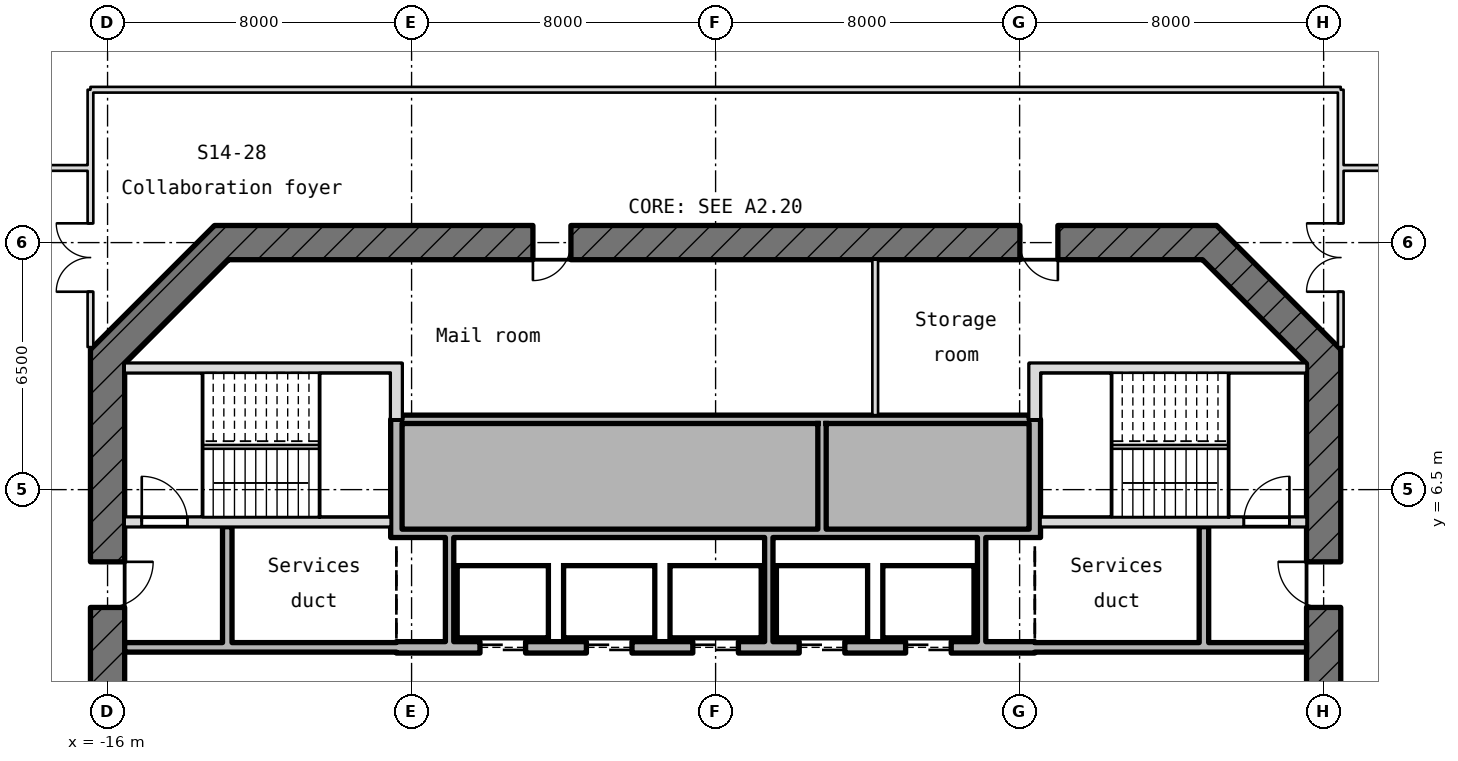
"""IFC4 building model, lengths in metres.
Left out: names, types, materials, properties, quantities, classifications, styles, units other than length and angle.
Written with IfcOpenShell. Run it as: python <this file> out.ifc"""

import sys

from ifc_helpers import new_model, si_unit, direction, frame, frame_2d, origin, place, context, subcontext, project, spatial, rectangle, extrude, element, fill, save


model = new_model("IFC4")
c1 = context("Model", 3, precision=1e-05, world=origin(), true_north=direction((0.0, 1.0)))
c2 = subcontext(c1, "Body", "Model", "MODEL_VIEW")
j1 = project(units=[si_unit("LENGTHUNIT", "METRE"), si_unit("PLANEANGLEUNIT", "RADIAN")], contexts=[c1])
p1 = place(None, origin())
s1 = spatial("IfcSite", under=j1, at=p1, CompositionType="ELEMENT")
p2 = place(p1, origin())
s2 = spatial("IfcBuilding", under=s1, at=p2, CompositionType="ELEMENT")
p3 = place(p2, frame((0.0, 0.0, 210.85)))
s3 = spatial("IfcBuildingStorey", under=s2, at=p3, CompositionType="ELEMENT", Elevation=210.85)
p4 = place(p3, frame((-15.495, 21.126, 0.0), z_axis=(0.0, 0.0, 1.0), x_axis=(-0.76593385613, -0.642919379109, 0.0)))
e1 = element("IfcWall", 1, at=p4, inside=s3, PredefinedType="SOLIDWALL", context=c2, shape_type="SweptSolid", body=[
    extrude(rectangle(XDim=11.213, YDim=0.3, at=frame_2d((5.607, 0.0))), origin(), (0.0, 0.0, 1.0), 3.97),
])
p5 = place(p4, frame((7.513, 0.0, 0.0)))
e2 = element("IfcOpeningElement", 2, at=p5, cuts=e1, PredefinedType="OPENING", context=c2, shape_type="SweptSolid", body=[
    extrude(rectangle(XDim=1.8, YDim=2.4, at=frame_2d((0.9, 1.2))), frame((0.0, 0.16, 0.0), z_axis=(0.0, -1.0, 0.0), x_axis=(1.0, 0.0, 0.0)), (0.0, 0.0, 1.0), 0.32),
])
p6 = place(p4, frame((4.913, 0.0, 0.9)))
e3 = element("IfcOpeningElement", 3, at=p6, cuts=e1, PredefinedType="OPENING", context=c2, shape_type="SweptSolid", body=[
    extrude(rectangle(XDim=2.0, YDim=1.5, at=frame_2d((1.0, 0.75))), frame((0.0, 0.16, 0.0), z_axis=(0.0, -1.0, 0.0), x_axis=(1.0, 0.0, 0.0)), (0.0, 0.0, 1.0), 0.32),
])
p7 = place(p3, frame((16.0, -10.186, -0.18), z_axis=(0.0, 0.0, 1.0), x_axis=(0.0, 1.0, 0.0)))
e4 = element("IfcWall", 4, at=p7, inside=s3, PredefinedType="SHEAR", context=c2, shape_type="SweptSolid", body=[
    extrude(rectangle(XDim=20.373, YDim=0.9, at=frame_2d((10.186, 0.0))), origin(), (0.0, 0.0, 1.0), 4.15),
])
p8 = place(p7, frame((8.986, 0.0, 0.18)))
e5 = element("IfcOpeningElement", 5, at=p8, cuts=e4, PredefinedType="OPENING", context=c2, shape_type="SweptSolid", body=[
    extrude(rectangle(XDim=2.4, YDim=2.1, at=frame_2d((1.2, 1.05))), frame((0.0, 0.46, 0.0), z_axis=(0.0, -1.0, 0.0), x_axis=(1.0, 0.0, 0.0)), (0.0, 0.0, 1.0), 0.92),
])
p9 = place(p7, frame((13.586, 0.0, 0.18)))
e6 = element("IfcOpeningElement", 6, at=p9, cuts=e4, PredefinedType="OPENING", context=c2, shape_type="SweptSolid", body=[
    extrude(rectangle(XDim=1.2, YDim=2.1, at=frame_2d((0.6, 1.05))), frame((0.0, 0.46, 0.0), z_axis=(0.0, -1.0, 0.0), x_axis=(1.0, 0.0, 0.0)), (0.0, 0.0, 1.0), 0.92),
])
p10 = place(p7, frame((4.786, 0.0, 0.18)))
e7 = element("IfcOpeningElement", 7, at=p10, cuts=e4, PredefinedType="OPENING", context=c2, shape_type="SweptSolid", body=[
    extrude(rectangle(XDim=1.2, YDim=2.1, at=frame_2d((0.6, 1.05))), frame((0.0, 0.46, 0.0), z_axis=(0.0, -1.0, 0.0), x_axis=(1.0, 0.0, 0.0)), (0.0, 0.0, 1.0), 0.92),
])
p11 = place(p3, frame((16.132, 9.868, -0.18), z_axis=(0.0, 0.0, 1.0), x_axis=(-0.707106781187, 0.707106781187, 0.0)))
e8 = element("IfcWall", 8, at=p11, inside=s3, PredefinedType="SHEAR", context=c2, shape_type="SweptSolid", body=[
    extrude(rectangle(XDim=4.615, YDim=0.9, at=frame_2d((2.308, 0.0))), origin(), (0.0, 0.0, 1.0), 4.15),
])
p12 = place(p3, frame((13.186, 13.0, -0.18), z_axis=(0.0, 0.0, 1.0), x_axis=(-1.0, 0.0, 0.0)))
e9 = element("IfcWall", 9, at=p12, inside=s3, PredefinedType="SHEAR", context=c2, shape_type="SweptSolid", body=[
    extrude(rectangle(XDim=26.373, YDim=0.9, at=frame_2d((13.186, 0.0))), origin(), (0.0, 0.0, 1.0), 4.15),
])
p13 = place(p12, frame((16.993, 0.0, 0.18)))
e10 = element("IfcOpeningElement", 10, at=p13, cuts=e9, PredefinedType="OPENING", context=c2, shape_type="SweptSolid", body=[
    extrude(rectangle(XDim=1.0, YDim=2.1, at=frame_2d((0.5, 1.05))), frame((0.0, 0.46, 0.0), z_axis=(0.0, -1.0, 0.0), x_axis=(1.0, 0.0, 0.0)), (0.0, 0.0, 1.0), 0.92),
])
p14 = place(p12, frame((4.179, 0.0, 0.18)))
e11 = element("IfcOpeningElement", 11, at=p14, cuts=e9, PredefinedType="OPENING", context=c2, shape_type="SweptSolid", body=[
    extrude(rectangle(XDim=1.0, YDim=2.1, at=frame_2d((0.5, 1.05))), frame((0.0, 0.46, 0.0), z_axis=(0.0, -1.0, 0.0), x_axis=(1.0, 0.0, 0.0)), (0.0, 0.0, 1.0), 0.92),
])
p15 = place(p3, frame((-12.868, 13.132, -0.18), z_axis=(0.0, 0.0, 1.0), x_axis=(-0.707106781187, -0.707106781187, 0.0)))
e12 = element("IfcWall", 12, at=p15, inside=s3, PredefinedType="SHEAR", context=c2, shape_type="SweptSolid", body=[
    extrude(rectangle(XDim=4.615, YDim=0.9, at=frame_2d((2.308, 0.0))), origin(), (0.0, 0.0, 1.0), 4.15),
])
p16 = place(p3, frame((-16.0, 10.186, -0.18), z_axis=(0.0, 0.0, 1.0), x_axis=(0.0, -1.0, 0.0)))
e13 = element("IfcWall", 13, at=p16, inside=s3, PredefinedType="SHEAR", context=c2, shape_type="SweptSolid", body=[
    extrude(rectangle(XDim=20.373, YDim=0.9, at=frame_2d((10.186, 0.0))), origin(), (0.0, 0.0, 1.0), 4.15),
])
p17 = place(p16, frame((8.986, 0.0, 0.18)))
e14 = element("IfcOpeningElement", 14, at=p17, cuts=e13, PredefinedType="OPENING", context=c2, shape_type="SweptSolid", body=[
    extrude(rectangle(XDim=2.4, YDim=2.1, at=frame_2d((1.2, 1.05))), frame((0.0, 0.46, 0.0), z_axis=(0.0, -1.0, 0.0), x_axis=(1.0, 0.0, 0.0)), (0.0, 0.0, 1.0), 0.92),
])
p18 = place(p16, frame((5.586, 0.0, 0.18)))
e15 = element("IfcOpeningElement", 15, at=p18, cuts=e13, PredefinedType="OPENING", context=c2, shape_type="SweptSolid", body=[
    extrude(rectangle(XDim=1.2, YDim=2.1, at=frame_2d((0.6, 1.05))), frame((0.0, 0.46, 0.0), z_axis=(0.0, -1.0, 0.0), x_axis=(1.0, 0.0, 0.0)), (0.0, 0.0, 1.0), 0.92),
])
p19 = place(p3, frame((-15.55, 2.35, 0.0), z_axis=(0.0, 0.0, 1.0), x_axis=(1.0, 0.0, 0.0)))
e16 = element("IfcWall", 16, at=p19, inside=s3, PredefinedType="STANDARD", context=c2, shape_type="SweptSolid", body=[
    extrude(rectangle(XDim=7.15, YDim=0.25, at=frame_2d((3.575, 0.0))), origin(), (0.0, 0.0, 1.0), 3.97),
])
p20 = place(p3, frame((-8.4, 2.35, -0.18), z_axis=(0.0, 0.0, 1.0), x_axis=(1.0, 0.0, 0.0)))
e17 = element("IfcWall", 17, at=p20, inside=s3, PredefinedType="SHEAR", context=c2, shape_type="SweptSolid", body=[
    extrude(rectangle(XDim=16.8, YDim=0.3, at=frame_2d((8.4, 0.0))), origin(), (0.0, 0.0, 1.0), 4.15),
])
p21 = place(p20, frame((2.2, 0.0, 0.18)))
e18 = element("IfcOpeningElement", 18, at=p21, cuts=e17, PredefinedType="OPENING", context=c2, shape_type="SweptSolid", body=[
    extrude(rectangle(XDim=1.2, YDim=2.1, at=frame_2d((0.6, 1.05))), frame((0.0, 0.16, 0.0), z_axis=(0.0, -1.0, 0.0), x_axis=(1.0, 0.0, 0.0)), (0.0, 0.0, 1.0), 0.32),
])
p22 = place(p20, frame((5.0, 0.0, 0.18)))
e19 = element("IfcOpeningElement", 19, at=p22, cuts=e17, PredefinedType="OPENING", context=c2, shape_type="SweptSolid", body=[
    extrude(rectangle(XDim=1.2, YDim=2.1, at=frame_2d((0.6, 1.05))), frame((0.0, 0.16, 0.0), z_axis=(0.0, -1.0, 0.0), x_axis=(1.0, 0.0, 0.0)), (0.0, 0.0, 1.0), 0.32),
])
p23 = place(p20, frame((7.8, 0.0, 0.18)))
e20 = element("IfcOpeningElement", 20, at=p23, cuts=e17, PredefinedType="OPENING", context=c2, shape_type="SweptSolid", body=[
    extrude(rectangle(XDim=1.2, YDim=2.1, at=frame_2d((0.6, 1.05))), frame((0.0, 0.16, 0.0), z_axis=(0.0, -1.0, 0.0), x_axis=(1.0, 0.0, 0.0)), (0.0, 0.0, 1.0), 0.32),
])
p24 = place(p20, frame((10.6, 0.0, 0.18)))
e21 = element("IfcOpeningElement", 21, at=p24, cuts=e17, PredefinedType="OPENING", context=c2, shape_type="SweptSolid", body=[
    extrude(rectangle(XDim=1.2, YDim=2.1, at=frame_2d((0.6, 1.05))), frame((0.0, 0.16, 0.0), z_axis=(0.0, -1.0, 0.0), x_axis=(1.0, 0.0, 0.0)), (0.0, 0.0, 1.0), 0.32),
])
p25 = place(p20, frame((13.4, 0.0, 0.18)))
e22 = element("IfcOpeningElement", 22, at=p25, cuts=e17, PredefinedType="OPENING", context=c2, shape_type="SweptSolid", body=[
    extrude(rectangle(XDim=1.2, YDim=2.1, at=frame_2d((0.6, 1.05))), frame((0.0, 0.16, 0.0), z_axis=(0.0, -1.0, 0.0), x_axis=(1.0, 0.0, 0.0)), (0.0, 0.0, 1.0), 0.32),
])
p26 = place(p3, frame((8.4, 2.35, 0.0), z_axis=(0.0, 0.0, 1.0), x_axis=(1.0, 0.0, 0.0)))
e23 = element("IfcWall", 23, at=p26, inside=s3, PredefinedType="STANDARD", context=c2, shape_type="SweptSolid", body=[
    extrude(rectangle(XDim=7.15, YDim=0.25, at=frame_2d((3.575, 0.0))), origin(), (0.0, 0.0, 1.0), 3.97),
])
p27 = place(p3, frame((-8.25, 5.35, 0.0), z_axis=(0.0, 0.0, 1.0), x_axis=(1.0, 0.0, 0.0)))
e24 = element("IfcWall", 24, at=p27, inside=s3, PredefinedType="STANDARD", context=c2, shape_type="SweptSolid", body=[
    extrude(rectangle(XDim=16.5, YDim=0.22, at=frame_2d((8.25, 0.0))), origin(), (0.0, 0.0, 1.0), 3.97),
])
p28 = place(p3, frame((-15.55, 5.65, -0.18), z_axis=(0.0, 0.0, 1.0), x_axis=(1.0, 0.0, 0.0)))
e25 = element("IfcWall", 25, at=p28, inside=s3, PredefinedType="SHEAR", context=c2, shape_type="SweptSolid", body=[
    extrude(rectangle(XDim=7.0, YDim=0.25, at=frame_2d((3.5, 0.0))), origin(), (0.0, 0.0, 1.0), 4.15),
])
p29 = place(p28, frame((0.45, 0.0, 0.18)))
e26 = element("IfcOpeningElement", 26, at=p29, cuts=e25, PredefinedType="OPENING", context=c2, shape_type="SweptSolid", body=[
    extrude(rectangle(XDim=1.2, YDim=2.1, at=frame_2d((0.6, 1.05))), frame((0.0, 0.135, 0.0), z_axis=(0.0, -1.0, 0.0), x_axis=(1.0, 0.0, 0.0)), (0.0, 0.0, 1.0), 0.27),
])
p30 = place(p3, frame((8.55, 5.65, -0.18), z_axis=(0.0, 0.0, 1.0), x_axis=(1.0, 0.0, 0.0)))
e27 = element("IfcWall", 27, at=p30, inside=s3, PredefinedType="SHEAR", context=c2, shape_type="SweptSolid", body=[
    extrude(rectangle(XDim=7.0, YDim=0.25, at=frame_2d((3.5, 0.0))), origin(), (0.0, 0.0, 1.0), 4.15),
])
p31 = place(p30, frame((5.35, 0.0, 0.18)))
e28 = element("IfcOpeningElement", 28, at=p31, cuts=e27, PredefinedType="OPENING", context=c2, shape_type="SweptSolid", body=[
    extrude(rectangle(XDim=1.2, YDim=2.1, at=frame_2d((0.6, 1.05))), frame((0.0, 0.135, 0.0), z_axis=(0.0, -1.0, 0.0), x_axis=(1.0, 0.0, 0.0)), (0.0, 0.0, 1.0), 0.27),
])
p32 = place(p3, frame((-8.25, 8.35, 0.0), z_axis=(0.0, 0.0, 1.0), x_axis=(1.0, 0.0, 0.0)))
e29 = element("IfcWall", 29, at=p32, inside=s3, PredefinedType="STANDARD", context=c2, shape_type="SweptSolid", body=[
    extrude(rectangle(XDim=16.5, YDim=0.22, at=frame_2d((8.25, 0.0))), origin(), (0.0, 0.0, 1.0), 3.97),
])
for number, where, z_axis, x_axis in (
    (30, (-15.55, 9.7, -0.18), (0.0, 0.0, 1.0), (1.0, 0.0, 0.0)),
    (31, (8.55, 9.7, -0.18), (0.0, 0.0, 1.0), (1.0, 0.0, 0.0)),
):
    element("IfcWall", number, at=place(p3, frame(where, z_axis=z_axis, x_axis=x_axis)), inside=s3, PredefinedType="SHEAR", context=c2, shape_type="SweptSolid", body=[
        extrude(rectangle(XDim=7.0, YDim=0.25, at=frame_2d((3.5, 0.0))), origin(), (0.0, 0.0, 1.0), 4.15),
    ])
p33 = place(p3, frame((-12.85, 2.475, 0.0), z_axis=(0.0, 0.0, 1.0), x_axis=(0.0, 1.0, 0.0)))
e32 = element("IfcWall", 32, at=p33, inside=s3, PredefinedType="STANDARD", context=c2, shape_type="SweptSolid", body=[
    extrude(rectangle(XDim=3.05, YDim=0.25, at=frame_2d((1.525, 0.0))), origin(), (0.0, 0.0, 1.0), 3.97),
])
p34 = place(p3, frame((-8.4, 5.24, -0.18), z_axis=(0.0, 0.0, 1.0), x_axis=(0.0, 1.0, 0.0)))
e33 = element("IfcWall", 33, at=p34, inside=s3, PredefinedType="SHEAR", context=c2, shape_type="SweptSolid", body=[
    extrude(rectangle(XDim=3.11, YDim=0.3, at=frame_2d((1.555, 0.0))), origin(), (0.0, 0.0, 1.0), 4.15),
])
p35 = place(p3, frame((-8.4, 8.35, -0.18), z_axis=(0.0, 0.0, 1.0), x_axis=(0.0, 1.0, 0.0)))
e34 = element("IfcWall", 34, at=p35, inside=s3, PredefinedType="SHEAR", context=c2, shape_type="SweptSolid", body=[
    extrude(rectangle(XDim=1.475, YDim=0.3, at=frame_2d((0.737, 0.0))), origin(), (0.0, 0.0, 1.0), 4.15),
])
for number, where, z_axis, x_axis in (
    (35, (-7.0, 2.5, 0.0), (0.0, 0.0, 1.0), (0.0, 1.0, 0.0)),
    (36, (1.4, 2.5, 0.0), (0.0, 0.0, 1.0), (0.0, 1.0, 0.0)),
):
    element("IfcWall", number, at=place(p3, frame(where, z_axis=z_axis, x_axis=x_axis)), inside=s3, PredefinedType="STANDARD", context=c2, shape_type="SweptSolid", body=[
        extrude(rectangle(XDim=2.74, YDim=0.22, at=frame_2d((1.37, 0.0))), origin(), (0.0, 0.0, 1.0), 3.97),
    ])
p36 = place(p3, frame((2.8, 5.46, 0.0), z_axis=(0.0, 0.0, 1.0), x_axis=(0.0, 1.0, 0.0)))
e37 = element("IfcWall", 37, at=p36, inside=s3, PredefinedType="STANDARD", context=c2, shape_type="SweptSolid", body=[
    extrude(rectangle(XDim=2.78, YDim=0.22, at=frame_2d((1.39, 0.0))), origin(), (0.0, 0.0, 1.0), 3.97),
])
p37 = place(p3, frame((4.2, 8.46, 0.0), z_axis=(0.0, 0.0, 1.0), x_axis=(0.0, 1.0, 0.0)))
e38 = element("IfcWall", 38, at=p37, inside=s3, PredefinedType="PARTITIONING", context=c2, shape_type="SweptSolid", body=[
    extrude(rectangle(XDim=4.09, YDim=0.15, at=frame_2d((2.045, 0.0))), origin(), (0.0, 0.0, 1.0), 3.97),
])
p38 = place(p3, frame((7.0, 2.5, 0.0), z_axis=(0.0, 0.0, 1.0), x_axis=(0.0, 1.0, 0.0)))
e39 = element("IfcWall", 39, at=p38, inside=s3, PredefinedType="STANDARD", context=c2, shape_type="SweptSolid", body=[
    extrude(rectangle(XDim=2.74, YDim=0.22, at=frame_2d((1.37, 0.0))), origin(), (0.0, 0.0, 1.0), 3.97),
])
p39 = place(p3, frame((8.4, 5.24, -0.18), z_axis=(0.0, 0.0, 1.0), x_axis=(0.0, 1.0, 0.0)))
e40 = element("IfcWall", 40, at=p39, inside=s3, PredefinedType="SHEAR", context=c2, shape_type="SweptSolid", body=[
    extrude(rectangle(XDim=3.11, YDim=0.3, at=frame_2d((1.555, 0.0))), origin(), (0.0, 0.0, 1.0), 4.15),
])
p40 = place(p3, frame((8.4, 8.35, -0.18), z_axis=(0.0, 0.0, 1.0), x_axis=(0.0, 1.0, 0.0)))
e41 = element("IfcWall", 41, at=p40, inside=s3, PredefinedType="SHEAR", context=c2, shape_type="SweptSolid", body=[
    extrude(rectangle(XDim=1.475, YDim=0.3, at=frame_2d((0.737, 0.0))), origin(), (0.0, 0.0, 1.0), 4.15),
])
p41 = place(p3, frame((12.85, 2.475, 0.0), z_axis=(0.0, 0.0, 1.0), x_axis=(0.0, 1.0, 0.0)))
e42 = element("IfcWall", 42, at=p41, inside=s3, PredefinedType="STANDARD", context=c2, shape_type="SweptSolid", body=[
    extrude(rectangle(XDim=3.05, YDim=0.25, at=frame_2d((1.525, 0.0))), origin(), (0.0, 0.0, 1.0), 3.97),
])
p42 = place(p3, frame((-19.15, 14.964, 0.0), z_axis=(0.0, 0.0, 1.0), x_axis=(1.0, 0.0, 0.0)))
e43 = element("IfcWall", 43, at=p42, inside=s3, PredefinedType="PARTITIONING", context=c2, shape_type="SweptSolid", body=[
    extrude(rectangle(XDim=2.7, YDim=0.15, at=frame_2d((1.35, 0.0))), origin(), (0.0, 0.0, 1.0), 3.97),
])
p43 = place(p3, frame((-16.45, 10.25, 0.0), z_axis=(0.0, 0.0, 1.0), x_axis=(0.0, 1.0, 0.0)))
e44 = element("IfcWall", 44, at=p43, inside=s3, PredefinedType="PARTITIONING", context=c2, shape_type="SweptSolid", body=[
    extrude(rectangle(XDim=6.772, YDim=0.15, at=frame_2d((3.386, 0.0))), origin(), (0.0, 0.0, 1.0), 3.97),
])
p44 = place(p43, frame((1.457, 0.0, 0.0)))
e45 = element("IfcOpeningElement", 45, at=p44, cuts=e44, PredefinedType="OPENING", context=c2, shape_type="SweptSolid", body=[
    extrude(rectangle(XDim=1.8, YDim=2.1, at=frame_2d((0.9, 1.05))), frame((0.0, 0.085, 0.0), z_axis=(0.0, -1.0, 0.0), x_axis=(1.0, 0.0, 0.0)), (0.0, 0.0, 1.0), 0.17),
])
p45 = place(p3, frame((-16.45, 17.022, 0.0), z_axis=(0.0, 0.0, 1.0), x_axis=(1.0, 0.0, 0.0)))
e46 = element("IfcWall", 46, at=p45, inside=s3, PredefinedType="PARTITIONING", context=c2, shape_type="SweptSolid", body=[
    extrude(rectangle(XDim=32.9, YDim=0.15, at=frame_2d((16.45, 0.0))), origin(), (0.0, 0.0, 1.0), 3.97),
])
p46 = place(p3, frame((16.45, 10.25, 0.0), z_axis=(0.0, 0.0, 1.0), x_axis=(0.0, 1.0, 0.0)))
e47 = element("IfcWall", 47, at=p46, inside=s3, PredefinedType="PARTITIONING", context=c2, shape_type="SweptSolid", body=[
    extrude(rectangle(XDim=6.772, YDim=0.15, at=frame_2d((3.386, 0.0))), origin(), (0.0, 0.0, 1.0), 3.97),
])
p47 = place(p46, frame((1.457, 0.0, 0.0)))
e48 = element("IfcOpeningElement", 48, at=p47, cuts=e47, PredefinedType="OPENING", context=c2, shape_type="SweptSolid", body=[
    extrude(rectangle(XDim=1.8, YDim=2.1, at=frame_2d((0.9, 1.05))), frame((0.0, 0.085, 0.0), z_axis=(0.0, -1.0, 0.0), x_axis=(1.0, 0.0, 0.0)), (0.0, 0.0, 1.0), 0.17),
])
p48 = place(p3, frame((16.45, 14.964, 0.0), z_axis=(0.0, 0.0, 1.0), x_axis=(1.0, 0.0, 0.0)))
e49 = element("IfcWall", 49, at=p48, inside=s3, PredefinedType="PARTITIONING", context=c2, shape_type="SweptSolid", body=[
    extrude(rectangle(XDim=2.7, YDim=0.15, at=frame_2d((1.35, 0.0))), origin(), (0.0, 0.0, 1.0), 3.97),
])
p49 = place(p21, origin())
e50 = element("IfcDoor", 50, at=p49, inside=s3, OperationType="DOUBLE_DOOR_SLIDING", PredefinedType="DOOR", context=c2, shape_type="SweptSolid", body=[
    extrude(rectangle(XDim=1.2, YDim=2.1, at=frame_2d((0.6, 1.05))), frame((0.0, 0.025, 0.0), z_axis=(0.0, -1.0, 0.0), x_axis=(1.0, 0.0, 0.0)), (0.0, 0.0, 1.0), 0.05),
])
fill(e18, e50)
p50 = place(p22, origin())
e51 = element("IfcDoor", 51, at=p50, inside=s3, OperationType="DOUBLE_DOOR_SLIDING", PredefinedType="DOOR", context=c2, shape_type="SweptSolid", body=[
    extrude(rectangle(XDim=1.2, YDim=2.1, at=frame_2d((0.6, 1.05))), frame((0.0, 0.025, 0.0), z_axis=(0.0, -1.0, 0.0), x_axis=(1.0, 0.0, 0.0)), (0.0, 0.0, 1.0), 0.05),
])
fill(e19, e51)
p51 = place(p23, origin())
e52 = element("IfcDoor", 52, at=p51, inside=s3, OperationType="DOUBLE_DOOR_SLIDING", PredefinedType="DOOR", context=c2, shape_type="SweptSolid", body=[
    extrude(rectangle(XDim=1.2, YDim=2.1, at=frame_2d((0.6, 1.05))), frame((0.0, 0.025, 0.0), z_axis=(0.0, -1.0, 0.0), x_axis=(1.0, 0.0, 0.0)), (0.0, 0.0, 1.0), 0.05),
])
fill(e20, e52)
p52 = place(p24, origin())
e53 = element("IfcDoor", 53, at=p52, inside=s3, OperationType="DOUBLE_DOOR_SLIDING", PredefinedType="DOOR", context=c2, shape_type="SweptSolid", body=[
    extrude(rectangle(XDim=1.2, YDim=2.1, at=frame_2d((0.6, 1.05))), frame((0.0, 0.025, 0.0), z_axis=(0.0, -1.0, 0.0), x_axis=(1.0, 0.0, 0.0)), (0.0, 0.0, 1.0), 0.05),
])
fill(e21, e53)
p53 = place(p25, origin())
e54 = element("IfcDoor", 54, at=p53, inside=s3, OperationType="DOUBLE_DOOR_SLIDING", PredefinedType="DOOR", context=c2, shape_type="SweptSolid", body=[
    extrude(rectangle(XDim=1.2, YDim=2.1, at=frame_2d((0.6, 1.05))), frame((0.0, 0.025, 0.0), z_axis=(0.0, -1.0, 0.0), x_axis=(1.0, 0.0, 0.0)), (0.0, 0.0, 1.0), 0.05),
])
fill(e22, e54)
p54 = place(p29, origin())
e55 = element("IfcDoor", 55, at=p54, inside=s3, OperationType="SINGLE_SWING_RIGHT", PredefinedType="DOOR", context=c2, shape_type="SweptSolid", body=[
    extrude(rectangle(XDim=1.2, YDim=2.1, at=frame_2d((0.6, 1.05))), frame((0.0, 0.025, 0.0), z_axis=(0.0, -1.0, 0.0), x_axis=(1.0, 0.0, 0.0)), (0.0, 0.0, 1.0), 0.05),
])
fill(e26, e55)
p55 = place(p31, origin())
e56 = element("IfcDoor", 56, at=p55, inside=s3, OperationType="SINGLE_SWING_RIGHT", PredefinedType="DOOR", context=c2, shape_type="SweptSolid", body=[
    extrude(rectangle(XDim=1.2, YDim=2.1, at=frame_2d((0.6, 1.05))), frame((0.0, 0.025, 0.0), z_axis=(0.0, -1.0, 0.0), x_axis=(1.0, 0.0, 0.0)), (0.0, 0.0, 1.0), 0.05),
])
fill(e28, e56)
p56 = place(p18, origin())
e57 = element("IfcDoor", 57, at=p56, inside=s3, OperationType="SINGLE_SWING_RIGHT", PredefinedType="DOOR", context=c2, shape_type="SweptSolid", body=[
    extrude(rectangle(XDim=1.2, YDim=2.1, at=frame_2d((0.6, 1.05))), frame((0.0, 0.025, 0.0), z_axis=(0.0, -1.0, 0.0), x_axis=(1.0, 0.0, 0.0)), (0.0, 0.0, 1.0), 0.05),
])
fill(e15, e57)
p57 = place(p9, origin())
e58 = element("IfcDoor", 58, at=p57, inside=s3, OperationType="SINGLE_SWING_RIGHT", PredefinedType="DOOR", context=c2, shape_type="SweptSolid", body=[
    extrude(rectangle(XDim=1.2, YDim=2.1, at=frame_2d((0.6, 1.05))), frame((0.0, 0.025, 0.0), z_axis=(0.0, -1.0, 0.0), x_axis=(1.0, 0.0, 0.0)), (0.0, 0.0, 1.0), 0.05),
])
fill(e6, e58)
p58 = place(p13, origin())
e59 = element("IfcDoor", 59, at=p58, inside=s3, OperationType="SINGLE_SWING_RIGHT", PredefinedType="DOOR", context=c2, shape_type="SweptSolid", body=[
    extrude(rectangle(XDim=1.0, YDim=2.1, at=frame_2d((0.5, 1.05))), frame((0.0, 0.025, 0.0), z_axis=(0.0, -1.0, 0.0), x_axis=(1.0, 0.0, 0.0)), (0.0, 0.0, 1.0), 0.05),
])
fill(e10, e59)
p59 = place(p14, origin())
e60 = element("IfcDoor", 60, at=p59, inside=s3, OperationType="SINGLE_SWING_RIGHT", PredefinedType="DOOR", context=c2, shape_type="SweptSolid", body=[
    extrude(rectangle(XDim=1.0, YDim=2.1, at=frame_2d((0.5, 1.05))), frame((0.0, 0.025, 0.0), z_axis=(0.0, -1.0, 0.0), x_axis=(1.0, 0.0, 0.0)), (0.0, 0.0, 1.0), 0.05),
])
fill(e11, e60)
p60 = place(p44, origin())
e61 = element("IfcDoor", 61, at=p60, inside=s3, OperationType="DOUBLE_DOOR_SINGLE_SWING", PredefinedType="DOOR", context=c2, shape_type="SweptSolid", body=[
    extrude(rectangle(XDim=1.8, YDim=2.1, at=frame_2d((0.9, 1.05))), frame((0.0, 0.025, 0.0), z_axis=(0.0, -1.0, 0.0), x_axis=(1.0, 0.0, 0.0)), (0.0, 0.0, 1.0), 0.05),
])
fill(e45, e61)
p61 = place(p47, origin())
e62 = element("IfcDoor", 62, at=p61, inside=s3, OperationType="DOUBLE_DOOR_SINGLE_SWING", PredefinedType="DOOR", context=c2, shape_type="SweptSolid", body=[
    extrude(rectangle(XDim=1.8, YDim=2.1, at=frame_2d((0.9, 1.05))), frame((0.0, 0.025, 0.0), z_axis=(0.0, -1.0, 0.0), x_axis=(1.0, 0.0, 0.0)), (0.0, 0.0, 1.0), 0.05),
])
fill(e48, e62)
save(model, sys.argv[1])
